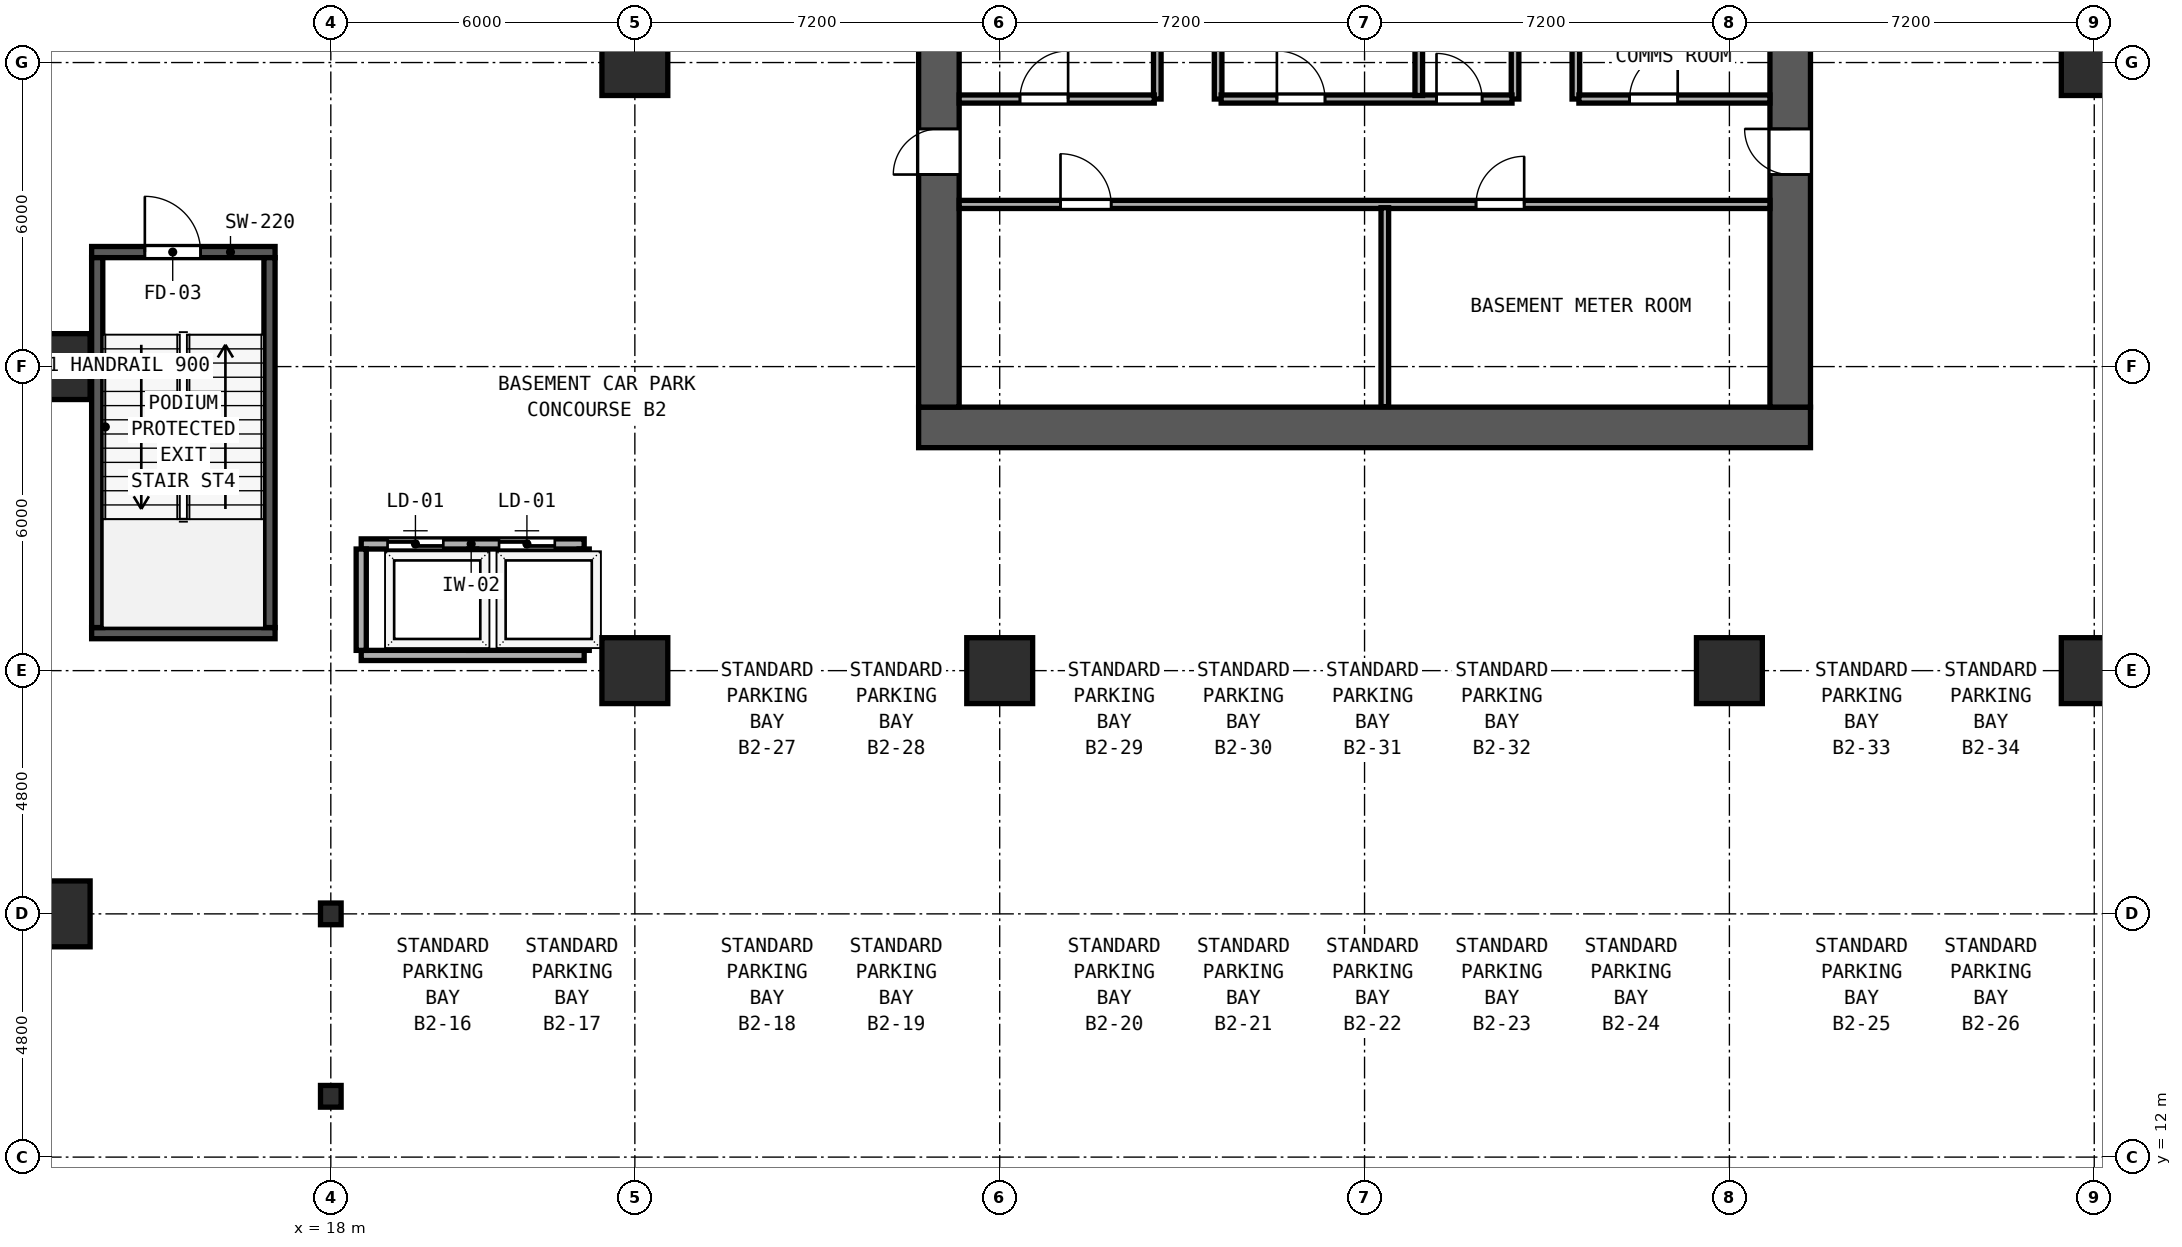
"""IFC4 building model, lengths in metres.
Left out: names, types, materials, properties, quantities, classifications, styles, units other than length and angle.
Written with IfcOpenShell. Run it as: python <this file> out.ifc"""

import sys

from ifc_helpers import new_model, si_unit, direction, frame, frame_2d, origin, origin_2d, place, context, subcontext, project, spatial, rectangle, hollow_rectangle, i_section, extrude, element, fill, save


model = new_model("IFC4")
c1 = context("Model", 3, precision=1e-05, world=origin(), true_north=direction((0.0, 1.0)))
c2 = subcontext(c1, "Body", "Model", "MODEL_VIEW")
j1 = project(units=[si_unit("LENGTHUNIT", "METRE"), si_unit("PLANEANGLEUNIT", "RADIAN")], contexts=[c1])
p1 = place(None, origin())
s1 = spatial("IfcSite", under=j1, at=p1, CompositionType="ELEMENT")
p2 = place(p1, origin())
s2 = spatial("IfcBuilding", under=s1, at=p2, CompositionType="ELEMENT")
p3 = place(p2, frame((0.0, 0.0, -9.6)))
s3 = spatial("IfcBuildingStorey", under=s2, at=p3, CompositionType="ELEMENT", Elevation=-9.6)
p4 = place(p3, frame((29.6, 26.4, 0.0), z_axis=(0.0, 0.0, 1.0), x_axis=(1.0, 0.0, 0.0)))
e1 = element("IfcWall", 1, at=p4, inside=s3, PredefinedType="SHEAR", context=c2, shape_type="SweptSolid", body=[
    extrude(rectangle(XDim=17.6, YDim=0.8, at=frame_2d((8.8, 0.0))), origin(), (0.0, 0.0, 1.0), 4.52),
])
p5 = place(p3, frame((30.0, 26.8, 0.0), z_axis=(0.0, 0.0, 1.0), x_axis=(0.0, 1.0, 0.0)))
e2 = element("IfcWall", 2, at=p5, inside=s3, PredefinedType="SHEAR", context=c2, shape_type="SweptSolid", body=[
    extrude(rectangle(XDim=16.0, YDim=0.8, at=frame_2d((8.0, 0.0))), origin(), (0.0, 0.0, 1.0), 4.52),
])
p6 = place(p5, frame((4.59, 0.0, 0.0)))
e3 = element("IfcOpeningElement", 3, at=p6, cuts=e2, PredefinedType="OPENING", context=c2, shape_type="SweptSolid", body=[
    extrude(rectangle(XDim=0.9, YDim=2.1, at=frame_2d((0.45, 1.05))), frame((0.0, 0.41, 0.0), z_axis=(0.0, -1.0, 0.0), x_axis=(1.0, 0.0, 0.0)), (0.0, 0.0, 1.0), 0.82),
])
p7 = place(p3, frame((46.8, 26.8, 0.0), z_axis=(0.0, 0.0, 1.0), x_axis=(0.0, 1.0, 0.0)))
e4 = element("IfcWall", 4, at=p7, inside=s3, PredefinedType="SHEAR", context=c2, shape_type="SweptSolid", body=[
    extrude(rectangle(XDim=16.0, YDim=0.8, at=frame_2d((8.0, 0.0))), origin(), (0.0, 0.0, 1.0), 4.52),
])
p8 = place(p7, frame((5.49, 0.0, 0.0), z_axis=(0.0, 0.0, 1.0), x_axis=(-1.0, 0.0, 0.0)))
e5 = element("IfcOpeningElement", 5, at=p8, cuts=e4, PredefinedType="OPENING", context=c2, shape_type="SweptSolid", body=[
    extrude(rectangle(XDim=0.9, YDim=2.1, at=frame_2d((0.45, 1.05))), frame((0.0, 0.41, 0.0), z_axis=(0.0, -1.0, 0.0), x_axis=(1.0, 0.0, 0.0)), (0.0, 0.0, 1.0), 0.82),
])
p9 = place(p3, frame((13.28, 29.86, 0.0), z_axis=(0.0, 0.0, 1.0), x_axis=(1.0, 0.0, 0.0)))
e6 = element("IfcWall", 6, at=p9, inside=s3, PredefinedType="SHEAR", context=c2, shape_type="SweptSolid", body=[
    extrude(rectangle(XDim=3.62, YDim=0.22, at=frame_2d((1.81, 0.0))), origin(), (0.0, 0.0, 1.0), 4.52),
])
p10 = place(p9, frame((1.05, 0.0, 0.0)))
e7 = element("IfcOpeningElement", 7, at=p10, cuts=e6, PredefinedType="OPENING", context=c2, shape_type="SweptSolid", body=[
    extrude(rectangle(XDim=1.1, YDim=2.15, at=frame_2d((0.55, 1.075))), frame((0.0, 0.12, 0.0), z_axis=(0.0, -1.0, 0.0), x_axis=(1.0, 0.0, 0.0)), (0.0, 0.0, 1.0), 0.24),
])
p11 = place(p3, frame((13.28, 22.34, 0.0), z_axis=(0.0, 0.0, 1.0), x_axis=(1.0, 0.0, 0.0)))
e8 = element("IfcWall", 8, at=p11, inside=s3, PredefinedType="SHEAR", context=c2, shape_type="SweptSolid", body=[
    extrude(rectangle(XDim=3.62, YDim=0.22, at=frame_2d((1.81, 0.0))), origin(), (0.0, 0.0, 1.0), 4.52),
])
for number, where, z_axis, x_axis in (
    (9, (13.39, 22.45, 0.0), (0.0, 0.0, 1.0), (0.0, 1.0, 0.0)),
    (10, (16.79, 22.45, 0.0), (0.0, 0.0, 1.0), (0.0, 1.0, 0.0)),
):
    element("IfcWall", number, at=place(p3, frame(where, z_axis=z_axis, x_axis=x_axis)), inside=s3, PredefinedType="SHEAR", context=c2, shape_type="SweptSolid", body=[
        extrude(rectangle(XDim=7.3, YDim=0.22, at=frame_2d((3.65, 0.0))), origin(), (0.0, 0.0, 1.0), 4.52),
    ])
for number, where, z_axis, x_axis in (
    (11, (24.0, 21.6, 0.0), (0.0, 0.0, 1.0), (1.0, 0.0, 0.0)),
    (12, (24.0, 33.6, 0.0), (0.0, 0.0, 1.0), (1.0, 0.0, 0.0)),
    (13, (52.8, 21.6, 0.0), (0.0, 0.0, 1.0), (1.0, 0.0, 0.0)),
    (14, (52.8, 33.6, 0.0), (0.0, 0.0, 1.0), (1.0, 0.0, 0.0)),
    (15, (31.2, 21.6, 0.0), (0.0, 0.0, 1.0), (1.0, 0.0, 0.0)),
    (16, (45.6, 21.6, 0.0), (0.0, 0.0, 1.0), (1.0, 0.0, 0.0)),
    (17, (12.6, 16.8, 0.0), (0.0, 0.0, 1.0), (1.0, 0.0, 0.0)),
    (18, (12.6, 27.6, 0.0), (0.0, 0.0, 1.0), (1.0, 0.0, 0.0)),
):
    element("IfcColumn", number, at=place(p3, frame(where, z_axis=z_axis, x_axis=x_axis)), inside=s3, PredefinedType="COLUMN", context=c2, shape_type="SweptSolid", body=[
        extrude(hollow_rectangle(XDim=1.3, YDim=1.3, WallThickness=0.048, at=origin_2d()), origin(), (0.0, 0.0, 1.0), 4.8),
    ])
for number, where, z_axis, x_axis in (
    (19, (18.0, 13.2, 0.0), (0.0, 0.0, 1.0), (1.0, 0.0, 0.0)),
    (20, (18.0, 16.8, 0.0), (0.0, 0.0, 1.0), (1.0, 0.0, 0.0)),
):
    element("IfcColumn", number, at=place(p3, frame(where, z_axis=z_axis, x_axis=x_axis)), inside=s3, PredefinedType="COLUMN", context=c2, shape_type="SweptSolid", body=[
        extrude(i_section(OverallWidth=0.407, OverallDepth=0.428, WebThickness=0.02, FlangeThickness=0.035, FilletRadius=0.022, at=origin_2d()), origin(), (0.0, 0.0, 1.0), 4.8),
    ])
for number, where, z_axis, x_axis in (
    (21, (34.31, 32.88, 0.0), (0.0, 0.0, 1.0), (0.0, 1.0, 0.0)),
    (22, (35.51, 32.88, 0.0), (0.0, 0.0, 1.0), (0.0, 1.0, 0.0)),
    (23, (41.37, 32.88, 0.0), (0.0, 0.0, 1.0), (0.0, 1.0, 0.0)),
    (24, (42.57, 32.88, 0.0), (0.0, 0.0, 1.0), (0.0, 1.0, 0.0)),
):
    element("IfcWall", number, at=place(p3, frame(where, z_axis=z_axis, x_axis=x_axis)), inside=s3, PredefinedType="SOLIDWALL", context=c2, shape_type="SweptSolid", body=[
        extrude(rectangle(XDim=2.17, YDim=0.15, at=frame_2d((1.085, 0.0))), origin(), (0.0, 0.0, 1.0), 4.52),
    ])
p12 = place(p3, frame((30.4, 32.88, 0.0), z_axis=(0.0, 0.0, 1.0), x_axis=(1.0, 0.0, 0.0)))
e25 = element("IfcWall", 25, at=p12, inside=s3, PredefinedType="SOLIDWALL", context=c2, shape_type="SweptSolid", body=[
    extrude(rectangle(XDim=3.85, YDim=0.16, at=frame_2d((1.925, 0.0))), origin(), (0.0, 0.0, 1.0), 4.52),
])
p13 = place(p12, frame((2.15, 0.0, 0.0), z_axis=(0.0, 0.0, 1.0), x_axis=(-1.0, 0.0, 0.0)))
e26 = element("IfcOpeningElement", 26, at=p13, cuts=e25, PredefinedType="OPENING", context=c2, shape_type="SweptSolid", body=[
    extrude(rectangle(XDim=0.95, YDim=2.12, at=frame_2d((0.475, 1.06))), frame((0.0, 0.09, 0.0), z_axis=(0.0, -1.0, 0.0), x_axis=(1.0, 0.0, 0.0)), (0.0, 0.0, 1.0), 0.18),
])
p14 = place(p3, frame((35.57, 32.88, 0.0), z_axis=(0.0, 0.0, 1.0), x_axis=(1.0, 0.0, 0.0)))
e27 = element("IfcWall", 27, at=p14, inside=s3, PredefinedType="SOLIDWALL", context=c2, shape_type="SweptSolid", body=[
    extrude(rectangle(XDim=5.74, YDim=0.16, at=frame_2d((2.87, 0.0))), origin(), (0.0, 0.0, 1.0), 4.52),
])
p15 = place(p14, frame((2.05, 0.0, 0.0), z_axis=(0.0, 0.0, 1.0), x_axis=(-1.0, 0.0, 0.0)))
e28 = element("IfcOpeningElement", 28, at=p15, cuts=e27, PredefinedType="OPENING", context=c2, shape_type="SweptSolid", body=[
    extrude(rectangle(XDim=0.95, YDim=2.12, at=frame_2d((0.475, 1.06))), frame((0.0, 0.09, 0.0), z_axis=(0.0, -1.0, 0.0), x_axis=(1.0, 0.0, 0.0)), (0.0, 0.0, 1.0), 0.18),
])
p16 = place(p14, frame((5.15, 0.0, 0.0), z_axis=(0.0, 0.0, 1.0), x_axis=(-1.0, 0.0, 0.0)))
e29 = element("IfcOpeningElement", 29, at=p16, cuts=e27, PredefinedType="OPENING", context=c2, shape_type="SweptSolid", body=[
    extrude(rectangle(XDim=0.9, YDim=2.1, at=frame_2d((0.45, 1.05))), frame((0.0, 0.09, 0.0), z_axis=(0.0, -1.0, 0.0), x_axis=(1.0, 0.0, 0.0)), (0.0, 0.0, 1.0), 0.18),
])
p17 = place(p3, frame((42.63, 32.88, 0.0), z_axis=(0.0, 0.0, 1.0), x_axis=(1.0, 0.0, 0.0)))
e30 = element("IfcWall", 30, at=p17, inside=s3, PredefinedType="SOLIDWALL", context=c2, shape_type="SweptSolid", body=[
    extrude(rectangle(XDim=3.77, YDim=0.16, at=frame_2d((1.885, 0.0))), origin(), (0.0, 0.0, 1.0), 4.52),
])
p18 = place(p17, frame((1.95, 0.0, 0.0), z_axis=(0.0, 0.0, 1.0), x_axis=(-1.0, 0.0, 0.0)))
e31 = element("IfcOpeningElement", 31, at=p18, cuts=e30, PredefinedType="OPENING", context=c2, shape_type="SweptSolid", body=[
    extrude(rectangle(XDim=0.95, YDim=2.12, at=frame_2d((0.475, 1.06))), frame((0.0, 0.09, 0.0), z_axis=(0.0, -1.0, 0.0), x_axis=(1.0, 0.0, 0.0)), (0.0, 0.0, 1.0), 0.18),
])
p19 = place(p3, frame((39.47, 32.95, 0.0), z_axis=(0.0, 0.0, 1.0), x_axis=(0.0, 1.0, 0.0)))
e32 = element("IfcWall", 32, at=p19, inside=s3, PredefinedType="SOLIDWALL", context=c2, shape_type="SweptSolid", body=[
    extrude(rectangle(XDim=2.05, YDim=0.15, at=frame_2d((1.025, 0.0))), origin(), (0.0, 0.0, 1.0), 4.52),
])
p20 = place(p3, frame((30.4, 30.8, 0.0), z_axis=(0.0, 0.0, 1.0), x_axis=(1.0, 0.0, 0.0)))
e33 = element("IfcWall", 33, at=p20, inside=s3, PredefinedType="SOLIDWALL", context=c2, shape_type="SweptSolid", body=[
    extrude(rectangle(XDim=16.0, YDim=0.16, at=frame_2d((8.0, 0.0))), origin(), (0.0, 0.0, 1.0), 4.52),
])
p21 = place(p20, frame((2.0, 0.0, 0.0)))
e34 = element("IfcOpeningElement", 34, at=p21, cuts=e33, PredefinedType="OPENING", context=c2, shape_type="SweptSolid", body=[
    extrude(rectangle(XDim=1.0, YDim=2.1, at=frame_2d((0.5, 1.05))), frame((0.0, 0.09, 0.0), z_axis=(0.0, -1.0, 0.0), x_axis=(1.0, 0.0, 0.0)), (0.0, 0.0, 1.0), 0.18),
])
p22 = place(p20, frame((10.2, 0.0, 0.0)))
e35 = element("IfcOpeningElement", 35, at=p22, cuts=e33, PredefinedType="OPENING", context=c2, shape_type="SweptSolid", body=[
    extrude(rectangle(XDim=0.95, YDim=2.12, at=frame_2d((0.475, 1.06))), frame((0.0, 0.09, 0.0), z_axis=(0.0, -1.0, 0.0), x_axis=(1.0, 0.0, 0.0)), (0.0, 0.0, 1.0), 0.18),
])
p23 = place(p3, frame((38.8, 26.81, 0.0), z_axis=(0.0, 0.0, 1.0), x_axis=(0.0, 1.0, 0.0)))
e36 = element("IfcWall", 36, at=p23, inside=s3, PredefinedType="SOLIDWALL", context=c2, shape_type="SweptSolid", body=[
    extrude(rectangle(XDim=3.925, YDim=0.15, at=frame_2d((1.962, 0.0))), origin(), (0.0, 0.0, 1.0), 4.52),
])
p24 = place(p3, frame((18.6, 24.1, 0.0), z_axis=(0.0, 0.0, 1.0), x_axis=(1.0, 0.0, 0.0)))
e37 = element("IfcWall", 37, at=p24, inside=s3, PredefinedType="SOLIDWALL", context=c2, shape_type="SweptSolid", body=[
    extrude(rectangle(XDim=4.4, YDim=0.2, at=frame_2d((2.2, 0.0))), origin(), (0.0, 0.0, 1.0), 4.52),
])
p25 = place(p24, frame((0.52, 0.0, 0.0)))
e38 = element("IfcOpeningElement", 38, at=p25, cuts=e37, PredefinedType="OPENING", context=c2, shape_type="SweptSolid", body=[
    extrude(rectangle(XDim=1.1, YDim=2.2, at=frame_2d((0.55, 1.1))), frame((0.0, 0.11, 0.0), z_axis=(0.0, -1.0, 0.0), x_axis=(1.0, 0.0, 0.0)), (0.0, 0.0, 1.0), 0.22),
])
p26 = place(p24, frame((2.72, 0.0, 0.0)))
e39 = element("IfcOpeningElement", 39, at=p26, cuts=e37, PredefinedType="OPENING", context=c2, shape_type="SweptSolid", body=[
    extrude(rectangle(XDim=1.1, YDim=2.2, at=frame_2d((0.55, 1.1))), frame((0.0, 0.11, 0.0), z_axis=(0.0, -1.0, 0.0), x_axis=(1.0, 0.0, 0.0)), (0.0, 0.0, 1.0), 0.22),
])
p27 = place(p3, frame((18.6, 21.9, 0.0), z_axis=(0.0, 0.0, 1.0), x_axis=(1.0, 0.0, 0.0)))
e40 = element("IfcWall", 40, at=p27, inside=s3, PredefinedType="SOLIDWALL", context=c2, shape_type="SweptSolid", body=[
    extrude(rectangle(XDim=4.4, YDim=0.2, at=frame_2d((2.2, 0.0))), origin(), (0.0, 0.0, 1.0), 4.52),
])
for number, where, z_axis, x_axis in (
    (41, (18.6, 22.0, 0.0), (0.0, 0.0, 1.0), (0.0, 1.0, 0.0)),
    (42, (23.0, 22.0, 0.0), (0.0, 0.0, 1.0), (0.0, 1.0, 0.0)),
):
    element("IfcWall", number, at=place(p3, frame(where, z_axis=z_axis, x_axis=x_axis)), inside=s3, PredefinedType="SOLIDWALL", context=c2, shape_type="SweptSolid", body=[
        extrude(rectangle(XDim=2.0, YDim=0.2, at=frame_2d((1.0, 0.0))), origin(), (0.0, 0.0, 1.0), 4.52),
    ])
p28 = place(p3, frame((20.8, 22.0, 0.0), z_axis=(0.0, 0.0, 1.0), x_axis=(0.0, 1.0, 0.0)))
e43 = element("IfcWall", 43, at=p28, inside=s3, PredefinedType="SOLIDWALL", context=c2, shape_type="SweptSolid", body=[
    extrude(rectangle(XDim=2.0, YDim=0.16, at=frame_2d((1.0, 0.0))), origin(), (0.0, 0.0, 1.0), 4.52),
])
p29 = place(p6, origin())
e44 = element("IfcDoor", 44, at=p29, inside=s3, OperationType="SINGLE_SWING_LEFT", PredefinedType="DOOR", context=c2, shape_type="SweptSolid", body=[
    extrude(rectangle(XDim=0.9, YDim=2.1, at=frame_2d((0.45, 1.05))), frame((0.0, 0.025, 0.0), z_axis=(0.0, -1.0, 0.0), x_axis=(1.0, 0.0, 0.0)), (0.0, 0.0, 1.0), 0.05),
])
fill(e3, e44)
p30 = place(p8, origin())
e45 = element("IfcDoor", 45, at=p30, inside=s3, OperationType="SINGLE_SWING_LEFT", PredefinedType="DOOR", context=c2, shape_type="SweptSolid", body=[
    extrude(rectangle(XDim=0.9, YDim=2.1, at=frame_2d((0.45, 1.05))), frame((0.0, 0.025, 0.0), z_axis=(0.0, -1.0, 0.0), x_axis=(1.0, 0.0, 0.0)), (0.0, 0.0, 1.0), 0.05),
])
fill(e5, e45)
p31 = place(p13, origin())
e46 = element("IfcDoor", 46, at=p31, inside=s3, OperationType="SINGLE_SWING_LEFT", PredefinedType="DOOR", context=c2, shape_type="SweptSolid", body=[
    extrude(rectangle(XDim=0.95, YDim=2.12, at=frame_2d((0.475, 1.06))), frame((0.0, 0.025, 0.0), z_axis=(0.0, -1.0, 0.0), x_axis=(1.0, 0.0, 0.0)), (0.0, 0.0, 1.0), 0.05),
])
fill(e26, e46)
p32 = place(p15, origin())
e47 = element("IfcDoor", 47, at=p32, inside=s3, OperationType="SINGLE_SWING_RIGHT", PredefinedType="DOOR", context=c2, shape_type="SweptSolid", body=[
    extrude(rectangle(XDim=0.95, YDim=2.12, at=frame_2d((0.475, 1.06))), frame((0.0, 0.025, 0.0), z_axis=(0.0, -1.0, 0.0), x_axis=(1.0, 0.0, 0.0)), (0.0, 0.0, 1.0), 0.05),
])
fill(e28, e47)
p33 = place(p16, origin())
e48 = element("IfcDoor", 48, at=p33, inside=s3, OperationType="SINGLE_SWING_RIGHT", PredefinedType="DOOR", context=c2, shape_type="SweptSolid", body=[
    extrude(rectangle(XDim=0.9, YDim=2.1, at=frame_2d((0.45, 1.05))), frame((0.0, 0.025, 0.0), z_axis=(0.0, -1.0, 0.0), x_axis=(1.0, 0.0, 0.0)), (0.0, 0.0, 1.0), 0.05),
])
fill(e29, e48)
p34 = place(p18, origin())
e49 = element("IfcDoor", 49, at=p34, inside=s3, OperationType="SINGLE_SWING_LEFT", PredefinedType="DOOR", context=c2, shape_type="SweptSolid", body=[
    extrude(rectangle(XDim=0.95, YDim=2.12, at=frame_2d((0.475, 1.06))), frame((0.0, 0.025, 0.0), z_axis=(0.0, -1.0, 0.0), x_axis=(1.0, 0.0, 0.0)), (0.0, 0.0, 1.0), 0.05),
])
fill(e31, e49)
p35 = place(p21, origin())
e50 = element("IfcDoor", 50, at=p35, inside=s3, OperationType="SINGLE_SWING_LEFT", PredefinedType="DOOR", context=c2, shape_type="SweptSolid", body=[
    extrude(rectangle(XDim=1.0, YDim=2.1, at=frame_2d((0.5, 1.05))), frame((0.0, 0.025, 0.0), z_axis=(0.0, -1.0, 0.0), x_axis=(1.0, 0.0, 0.0)), (0.0, 0.0, 1.0), 0.05),
])
fill(e34, e50)
p36 = place(p22, origin())
e51 = element("IfcDoor", 51, at=p36, inside=s3, OperationType="SINGLE_SWING_RIGHT", PredefinedType="DOOR", context=c2, shape_type="SweptSolid", body=[
    extrude(rectangle(XDim=0.95, YDim=2.12, at=frame_2d((0.475, 1.06))), frame((0.0, 0.025, 0.0), z_axis=(0.0, -1.0, 0.0), x_axis=(1.0, 0.0, 0.0)), (0.0, 0.0, 1.0), 0.05),
])
fill(e35, e51)
p37 = place(p10, origin())
e52 = element("IfcDoor", 52, at=p37, inside=s3, OperationType="SINGLE_SWING_LEFT", PredefinedType="DOOR", context=c2, shape_type="SweptSolid", body=[
    extrude(rectangle(XDim=1.1, YDim=2.15, at=frame_2d((0.55, 1.075))), frame((0.0, 0.025, 0.0), z_axis=(0.0, -1.0, 0.0), x_axis=(1.0, 0.0, 0.0)), (0.0, 0.0, 1.0), 0.05),
])
fill(e7, e52)
p38 = place(p25, origin())
e53 = element("IfcDoor", 53, at=p38, inside=s3, OperationType="SLIDING_TO_LEFT", PredefinedType="DOOR", context=c2, shape_type="SweptSolid", body=[
    extrude(rectangle(XDim=1.1, YDim=2.2, at=frame_2d((0.55, 1.1))), frame((0.0, 0.025, 0.0), z_axis=(0.0, -1.0, 0.0), x_axis=(1.0, 0.0, 0.0)), (0.0, 0.0, 1.0), 0.05),
])
fill(e38, e53)
p39 = place(p26, origin())
e54 = element("IfcDoor", 54, at=p39, inside=s3, OperationType="SLIDING_TO_LEFT", PredefinedType="DOOR", context=c2, shape_type="SweptSolid", body=[
    extrude(rectangle(XDim=1.1, YDim=2.2, at=frame_2d((0.55, 1.1))), frame((0.0, 0.025, 0.0), z_axis=(0.0, -1.0, 0.0), x_axis=(1.0, 0.0, 0.0)), (0.0, 0.0, 1.0), 0.05),
])
fill(e39, e54)
save(model, sys.argv[1])
